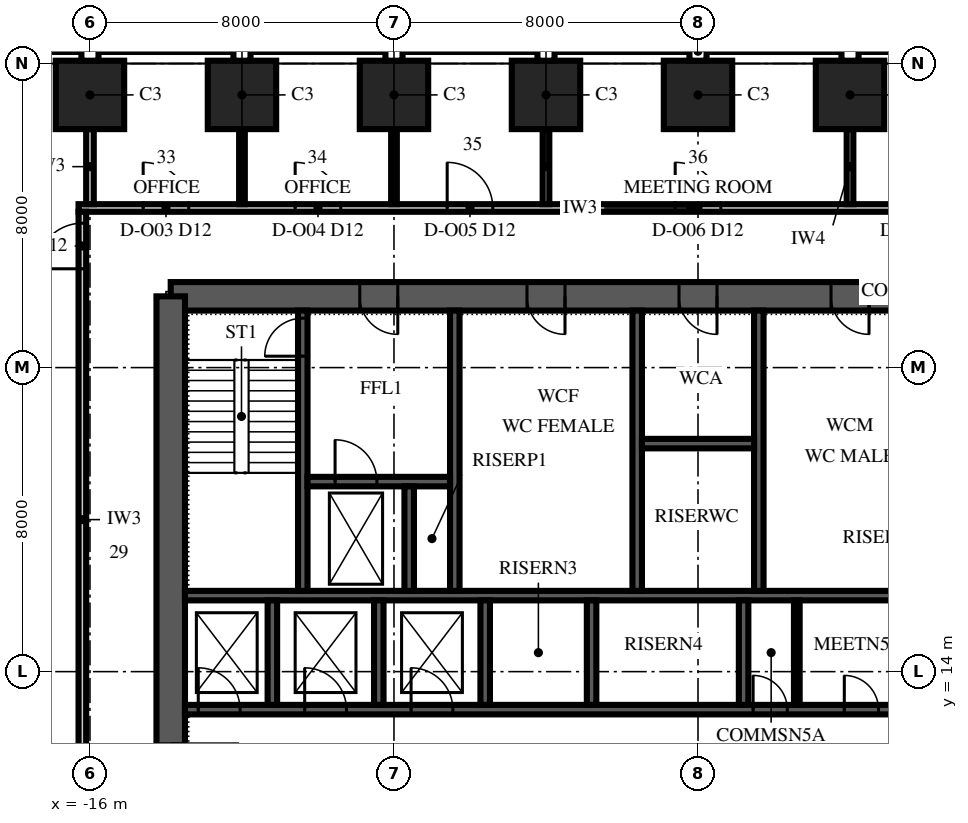
"""IFC4 building model, lengths in metres.
Left out: names, types, materials, properties, quantities, classifications, styles, units other than length and angle.
Written with IfcOpenShell. Run it as: python <this file> out.ifc"""

import sys

from ifc_helpers import new_model, si_unit, direction, frame, frame_2d, origin, origin_2d, place, context, subcontext, project, spatial, polyline, rectangle, outline, extrude, element, fill, save


model = new_model("IFC4")
c1 = context("Model", 3, precision=1e-05, world=origin(), true_north=direction((0.0, 1.0)))
c2 = subcontext(c1, "Body", "Model", "MODEL_VIEW")
j1 = project(units=[si_unit("LENGTHUNIT", "METRE"), si_unit("PLANEANGLEUNIT", "RADIAN")], contexts=[c1])
p1 = place(None, origin())
s1 = spatial("IfcSite", under=j1, at=p1, CompositionType="ELEMENT")
p2 = place(p1, origin())
s2 = spatial("IfcBuilding", under=s1, at=p2, CompositionType="ELEMENT")
p3 = place(p2, frame((0.0, 0.0, 127.0)))
s3 = spatial("IfcBuildingStorey", under=s2, at=p3, CompositionType="ELEMENT", Elevation=127.0)
for number, where, z_axis, x_axis in (
    (1, (4.0, 29.175, 0.0), (0.0, 0.0, 1.0), (-1.0, 0.0, 0.0)),
    (2, (0.0, 29.175, 0.0), (0.0, 0.0, 1.0), (-1.0, 0.0, 0.0)),
    (3, (-4.0, 29.175, 0.0), (0.0, 0.0, 1.0), (-1.0, 0.0, 0.0)),
    (4, (-8.0, 29.175, 0.0), (0.0, 0.0, 1.0), (-1.0, 0.0, 0.0)),
    (5, (-12.0, 29.175, 0.0), (0.0, 0.0, 1.0), (-1.0, 0.0, 0.0)),
    (6, (-16.0, 29.175, 0.0), (0.0, 0.0, 1.0), (-1.0, 0.0, 0.0)),
):
    element("IfcColumn", number, at=place(p3, frame(where, z_axis=z_axis, x_axis=x_axis)), inside=s3, PredefinedType="COLUMN", context=c2, shape_type="SweptSolid", body=[
        extrude(rectangle(XDim=1.8, YDim=1.8, at=origin_2d()), origin(), (0.0, 0.0, 1.0), 4.0),
    ])
p4 = place(p3, frame((13.875, 23.875, 0.0), z_axis=(0.0, 0.0, 1.0), x_axis=(-1.0, 0.0, 0.0)))
e7 = element("IfcWall", 7, at=p4, inside=s3, PredefinedType="SHEAR", context=c2, shape_type="SweptSolid", body=[
    extrude(rectangle(XDim=27.75, YDim=0.75, at=frame_2d((13.875, 0.0))), origin(), (0.0, 0.0, 1.0), 4.0),
])
p5 = place(p4, frame((21.775, 0.0, 0.0)))
e8 = element("IfcOpeningElement", 8, at=p5, cuts=e7, PredefinedType="OPENING", context=c2, shape_type="SweptSolid", body=[
    extrude(rectangle(XDim=1.0, YDim=2.1, at=frame_2d((0.5, 1.05))), frame((0.0, 0.39, 0.0), z_axis=(0.0, -1.0, 0.0), x_axis=(1.0, 0.0, 0.0)), (0.0, 0.0, 1.0), 0.78),
])
p6 = place(p4, frame((4.975, 0.0, 0.0)))
e9 = element("IfcOpeningElement", 9, at=p6, cuts=e7, PredefinedType="OPENING", context=c2, shape_type="SweptSolid", body=[
    extrude(rectangle(XDim=1.0, YDim=2.1, at=frame_2d((0.5, 1.05))), frame((0.0, 0.39, 0.0), z_axis=(0.0, -1.0, 0.0), x_axis=(1.0, 0.0, 0.0)), (0.0, 0.0, 1.0), 0.78),
])
p7 = place(p4, frame((17.375, 0.0, 0.0)))
e10 = element("IfcOpeningElement", 10, at=p7, cuts=e7, PredefinedType="OPENING", context=c2, shape_type="SweptSolid", body=[
    extrude(rectangle(XDim=1.0, YDim=2.1, at=frame_2d((0.5, 1.05))), frame((0.0, 0.39, 0.0), z_axis=(0.0, -1.0, 0.0), x_axis=(1.0, 0.0, 0.0)), (0.0, 0.0, 1.0), 0.78),
])
p8 = place(p4, frame((13.375, 0.0, 0.0)))
e11 = element("IfcOpeningElement", 11, at=p8, cuts=e7, PredefinedType="OPENING", context=c2, shape_type="SweptSolid", body=[
    extrude(rectangle(XDim=1.0, YDim=2.1, at=frame_2d((0.5, 1.05))), frame((0.0, 0.39, 0.0), z_axis=(0.0, -1.0, 0.0), x_axis=(1.0, 0.0, 0.0)), (0.0, 0.0, 1.0), 0.78),
])
p9 = place(p4, frame((9.375, 0.0, 0.0)))
e12 = element("IfcOpeningElement", 12, at=p9, cuts=e7, PredefinedType="OPENING", context=c2, shape_type="SweptSolid", body=[
    extrude(rectangle(XDim=1.0, YDim=2.1, at=frame_2d((0.5, 1.05))), frame((0.0, 0.39, 0.0), z_axis=(0.0, -1.0, 0.0), x_axis=(1.0, 0.0, 0.0)), (0.0, 0.0, 1.0), 0.78),
])
p10 = place(p3, frame((-13.875, 23.875, 0.0), z_axis=(0.0, 0.0, 1.0), x_axis=(0.0, -1.0, 0.0)))
e13 = element("IfcWall", 13, at=p10, inside=s3, PredefinedType="SHEAR", context=c2, shape_type="SweptSolid", body=[
    extrude(outline(polyline([(0.0, -0.375), (17.75, -0.375), (17.75, 0.0), (17.375, 0.0), (17.375, 0.375), (0.375, 0.375), (0.375, 0.0), (0.0, 0.0), (0.0, -0.375)])), origin(), (0.0, 0.0, 1.0), 4.0),
])
p11 = place(p10, frame((11.775, 0.0, 0.0)))
e14 = element("IfcOpeningElement", 14, at=p11, cuts=e13, PredefinedType="OPENING", context=c2, shape_type="SweptSolid", body=[
    extrude(rectangle(XDim=1.8, YDim=2.4, at=frame_2d((0.9, 1.2))), frame((0.0, 0.39, 0.0), z_axis=(0.0, -1.0, 0.0), x_axis=(1.0, 0.0, 0.0)), (0.0, 0.0, 1.0), 0.78),
])
p12 = place(p3, frame((-13.5, 13.0, 0.0), z_axis=(0.0, 0.0, 1.0), x_axis=(1.0, 0.0, 0.0)))
e15 = element("IfcWall", 15, at=p12, inside=s3, PredefinedType="SHEAR", context=c2, shape_type="SweptSolid", body=[
    extrude(rectangle(XDim=27.0, YDim=0.25, at=frame_2d((13.5, 0.0))), origin(), (0.0, 0.0, 1.0), 4.0),
])
p13 = place(p12, frame((0.35, 0.0, 0.0)))
e16 = element("IfcOpeningElement", 16, at=p13, cuts=e15, PredefinedType="OPENING", context=c2, shape_type="SweptSolid", body=[
    extrude(rectangle(XDim=1.1, YDim=2.1, at=frame_2d((0.55, 1.05))), frame((0.0, 0.14, 0.0), z_axis=(0.0, -1.0, 0.0), x_axis=(1.0, 0.0, 0.0)), (0.0, 0.0, 1.0), 0.28),
])
p14 = place(p12, frame((3.15, 0.0, 0.0)))
e17 = element("IfcOpeningElement", 17, at=p14, cuts=e15, PredefinedType="OPENING", context=c2, shape_type="SweptSolid", body=[
    extrude(rectangle(XDim=1.1, YDim=2.1, at=frame_2d((0.55, 1.05))), frame((0.0, 0.14, 0.0), z_axis=(0.0, -1.0, 0.0), x_axis=(1.0, 0.0, 0.0)), (0.0, 0.0, 1.0), 0.28),
])
p15 = place(p12, frame((5.95, 0.0, 0.0)))
e18 = element("IfcOpeningElement", 18, at=p15, cuts=e15, PredefinedType="OPENING", context=c2, shape_type="SweptSolid", body=[
    extrude(rectangle(XDim=1.1, YDim=2.1, at=frame_2d((0.55, 1.05))), frame((0.0, 0.14, 0.0), z_axis=(0.0, -1.0, 0.0), x_axis=(1.0, 0.0, 0.0)), (0.0, 0.0, 1.0), 0.28),
])
p16 = place(p12, frame((14.95, 0.0, 0.0)))
e19 = element("IfcOpeningElement", 19, at=p16, cuts=e15, PredefinedType="OPENING", context=c2, shape_type="SweptSolid", body=[
    extrude(rectangle(XDim=0.9, YDim=2.1, at=frame_2d((0.45, 1.05))), frame((0.0, 0.14, 0.0), z_axis=(0.0, -1.0, 0.0), x_axis=(1.0, 0.0, 0.0)), (0.0, 0.0, 1.0), 0.28),
])
p17 = place(p12, frame((17.35, 0.0, 0.0)))
e20 = element("IfcOpeningElement", 20, at=p17, cuts=e15, PredefinedType="OPENING", context=c2, shape_type="SweptSolid", body=[
    extrude(rectangle(XDim=0.9, YDim=2.1, at=frame_2d((0.45, 1.05))), frame((0.0, 0.14, 0.0), z_axis=(0.0, -1.0, 0.0), x_axis=(1.0, 0.0, 0.0)), (0.0, 0.0, 1.0), 0.28),
])
p18 = place(p12, frame((21.05, 0.0, 0.0)))
e21 = element("IfcOpeningElement", 21, at=p18, cuts=e15, PredefinedType="OPENING", context=c2, shape_type="SweptSolid", body=[
    extrude(rectangle(XDim=0.9, YDim=2.1, at=frame_2d((0.45, 1.05))), frame((0.0, 0.14, 0.0), z_axis=(0.0, -1.0, 0.0), x_axis=(1.0, 0.0, 0.0)), (0.0, 0.0, 1.0), 0.28),
])
p19 = place(p3, frame((-13.5, 16.0, 0.0), z_axis=(0.0, 0.0, 1.0), x_axis=(1.0, 0.0, 0.0)))
e22 = element("IfcWall", 22, at=p19, inside=s3, PredefinedType="SHEAR", context=c2, shape_type="SweptSolid", body=[
    extrude(rectangle(XDim=27.0, YDim=0.25, at=frame_2d((13.5, 0.0))), origin(), (0.0, 0.0, 1.0), 4.0),
])
for number, where, z_axis, x_axis in (
    (23, (-11.2, 13.125, 0.0), (0.0, 0.0, 1.0), (0.0, 1.0, 0.0)),
    (24, (-8.4, 13.125, 0.0), (0.0, 0.0, 1.0), (0.0, 1.0, 0.0)),
    (25, (-5.6, 13.125, 0.0), (0.0, 0.0, 1.0), (0.0, 1.0, 0.0)),
    (26, (-2.8, 13.125, 0.0), (0.0, 0.0, 1.0), (0.0, 1.0, 0.0)),
    (27, (1.2, 13.125, 0.0), (0.0, 0.0, 1.0), (0.0, 1.0, 0.0)),
):
    element("IfcWall", number, at=place(p3, frame(where, z_axis=z_axis, x_axis=x_axis)), inside=s3, PredefinedType="SHEAR", context=c2, shape_type="SweptSolid", body=[
        extrude(rectangle(XDim=2.75, YDim=0.25, at=frame_2d((1.375, 0.0))), origin(), (0.0, 0.0, 1.0), 4.0),
    ])
p20 = place(p3, frame((-10.4, 16.125, 0.0), z_axis=(0.0, 0.0, 1.0), x_axis=(0.0, 1.0, 0.0)))
e28 = element("IfcWall", 28, at=p20, inside=s3, PredefinedType="SHEAR", context=c2, shape_type="SweptSolid", body=[
    extrude(rectangle(XDim=7.375, YDim=0.25, at=frame_2d((3.688, 0.0))), origin(), (0.0, 0.0, 1.0), 4.0),
])
p21 = place(p20, frame((6.175, 0.0, 0.0)))
e29 = element("IfcOpeningElement", 29, at=p21, cuts=e28, PredefinedType="OPENING", context=c2, shape_type="SweptSolid", body=[
    extrude(rectangle(XDim=1.0, YDim=2.1, at=frame_2d((0.5, 1.05))), frame((0.0, 0.14, 0.0), z_axis=(0.0, -1.0, 0.0), x_axis=(1.0, 0.0, 0.0)), (0.0, 0.0, 1.0), 0.28),
])
for number, where, z_axis, x_axis in (
    (30, (-6.4, 16.125, 0.0), (0.0, 0.0, 1.0), (0.0, 1.0, 0.0)),
    (31, (-1.6, 16.125, 0.0), (0.0, 0.0, 1.0), (0.0, 1.0, 0.0)),
    (32, (1.6, 16.125, 0.0), (0.0, 0.0, 1.0), (0.0, 1.0, 0.0)),
):
    element("IfcWall", number, at=place(p3, frame(where, z_axis=z_axis, x_axis=x_axis)), inside=s3, PredefinedType="SHEAR", context=c2, shape_type="SweptSolid", body=[
        extrude(rectangle(XDim=7.375, YDim=0.25, at=frame_2d((3.688, 0.0))), origin(), (0.0, 0.0, 1.0), 4.0),
    ])
p22 = place(p3, frame((-10.275, 19.0, 0.0), z_axis=(0.0, 0.0, 1.0), x_axis=(1.0, 0.0, 0.0)))
e33 = element("IfcWall", 33, at=p22, inside=s3, PredefinedType="SHEAR", context=c2, shape_type="SweptSolid", body=[
    extrude(rectangle(XDim=3.75, YDim=0.25, at=frame_2d((1.875, 0.0))), origin(), (0.0, 0.0, 1.0), 4.0),
])
p23 = place(p22, frame((0.725, 0.0, 0.0)))
e34 = element("IfcOpeningElement", 34, at=p23, cuts=e33, PredefinedType="OPENING", context=c2, shape_type="SweptSolid", body=[
    extrude(rectangle(XDim=1.1, YDim=2.1, at=frame_2d((0.55, 1.05))), frame((0.0, 0.14, 0.0), z_axis=(0.0, -1.0, 0.0), x_axis=(1.0, 0.0, 0.0)), (0.0, 0.0, 1.0), 0.28),
])
p24 = place(p3, frame((-7.6, 16.125, 0.0), z_axis=(0.0, 0.0, 1.0), x_axis=(0.0, 1.0, 0.0)))
e35 = element("IfcWall", 35, at=p24, inside=s3, PredefinedType="SHEAR", context=c2, shape_type="SweptSolid", body=[
    extrude(rectangle(XDim=2.75, YDim=0.25, at=frame_2d((1.375, 0.0))), origin(), (0.0, 0.0, 1.0), 4.0),
])
p25 = place(p3, frame((-1.475, 20.0, 0.0), z_axis=(0.0, 0.0, 1.0), x_axis=(1.0, 0.0, 0.0)))
e36 = element("IfcWall", 36, at=p25, inside=s3, PredefinedType="SHEAR", context=c2, shape_type="SweptSolid", body=[
    extrude(rectangle(XDim=2.95, YDim=0.25, at=frame_2d((1.475, 0.0))), origin(), (0.0, 0.0, 1.0), 4.0),
])
p26 = place(p3, frame((2.6, 13.125, 0.0), z_axis=(0.0, 0.0, 1.0), x_axis=(0.0, 1.0, 0.0)))
e37 = element("IfcWall", 37, at=p26, inside=s3, PredefinedType="PARTITIONING", context=c2, shape_type="SweptSolid", body=[
    extrude(rectangle(XDim=2.75, YDim=0.15, at=frame_2d((1.375, 0.0))), origin(), (0.0, 0.0, 1.0), 3.85),
])
p27 = place(p3, frame((-16.3, 26.2, 0.0), z_axis=(0.0, 0.0, 1.0), x_axis=(1.0, 0.0, 0.0)))
e38 = element("IfcWall", 38, at=p27, inside=s3, PredefinedType="PARTITIONING", context=c2, shape_type="SweptSolid", body=[
    extrude(rectangle(XDim=32.2, YDim=0.2, at=frame_2d((16.1, 0.0))), origin(), (0.0, 0.0, 1.0), 3.4),
])
p28 = place(p27, frame((1.7, 0.0, 0.0)))
e39 = element("IfcOpeningElement", 39, at=p28, cuts=e38, PredefinedType="OPENING", context=c2, shape_type="SweptSolid", body=[
    extrude(rectangle(XDim=1.2, YDim=2.4, at=frame_2d((0.6, 1.2))), frame((0.0, 0.115, 0.0), z_axis=(0.0, -1.0, 0.0), x_axis=(1.0, 0.0, 0.0)), (0.0, 0.0, 1.0), 0.23),
])
p29 = place(p27, frame((5.7, 0.0, 0.0)))
e40 = element("IfcOpeningElement", 40, at=p29, cuts=e38, PredefinedType="OPENING", context=c2, shape_type="SweptSolid", body=[
    extrude(rectangle(XDim=1.2, YDim=2.4, at=frame_2d((0.6, 1.2))), frame((0.0, 0.115, 0.0), z_axis=(0.0, -1.0, 0.0), x_axis=(1.0, 0.0, 0.0)), (0.0, 0.0, 1.0), 0.23),
])
p30 = place(p27, frame((9.7, 0.0, 0.0)))
e41 = element("IfcOpeningElement", 41, at=p30, cuts=e38, PredefinedType="OPENING", context=c2, shape_type="SweptSolid", body=[
    extrude(rectangle(XDim=1.2, YDim=2.4, at=frame_2d((0.6, 1.2))), frame((0.0, 0.115, 0.0), z_axis=(0.0, -1.0, 0.0), x_axis=(1.0, 0.0, 0.0)), (0.0, 0.0, 1.0), 0.23),
])
p31 = place(p27, frame((15.7, 0.0, 0.0)))
e42 = element("IfcOpeningElement", 42, at=p31, cuts=e38, PredefinedType="OPENING", context=c2, shape_type="SweptSolid", body=[
    extrude(rectangle(XDim=1.2, YDim=2.4, at=frame_2d((0.6, 1.2))), frame((0.0, 0.115, 0.0), z_axis=(0.0, -1.0, 0.0), x_axis=(1.0, 0.0, 0.0)), (0.0, 0.0, 1.0), 0.23),
])
p32 = place(p27, frame((21.7, 0.0, 0.0)))
e43 = element("IfcOpeningElement", 43, at=p32, cuts=e38, PredefinedType="OPENING", context=c2, shape_type="SweptSolid", body=[
    extrude(rectangle(XDim=1.2, YDim=2.4, at=frame_2d((0.6, 1.2))), frame((0.0, 0.115, 0.0), z_axis=(0.0, -1.0, 0.0), x_axis=(1.0, 0.0, 0.0)), (0.0, 0.0, 1.0), 0.23),
])
p33 = place(p27, frame((25.7, 0.0, 0.0)))
e44 = element("IfcOpeningElement", 44, at=p33, cuts=e38, PredefinedType="OPENING", context=c2, shape_type="SweptSolid", body=[
    extrude(rectangle(XDim=1.2, YDim=2.4, at=frame_2d((0.6, 1.2))), frame((0.0, 0.115, 0.0), z_axis=(0.0, -1.0, 0.0), x_axis=(1.0, 0.0, 0.0)), (0.0, 0.0, 1.0), 0.23),
])
p34 = place(p27, frame((29.7, 0.0, 0.0)))
e45 = element("IfcOpeningElement", 45, at=p34, cuts=e38, PredefinedType="OPENING", context=c2, shape_type="SweptSolid", body=[
    extrude(rectangle(XDim=1.2, YDim=2.4, at=frame_2d((0.6, 1.2))), frame((0.0, 0.115, 0.0), z_axis=(0.0, -1.0, 0.0), x_axis=(1.0, 0.0, 0.0)), (0.0, 0.0, 1.0), 0.23),
])
p35 = place(p3, frame((-16.2, 9.9, 0.0), z_axis=(0.0, 0.0, 1.0), x_axis=(0.0, 1.0, 0.0)))
e46 = element("IfcWall", 46, at=p35, inside=s3, PredefinedType="PARTITIONING", context=c2, shape_type="SweptSolid", body=[
    extrude(rectangle(XDim=16.2, YDim=0.2, at=frame_2d((8.1, 0.0))), origin(), (0.0, 0.0, 1.0), 3.25),
])
p36 = place(p35, frame((14.7, 0.0, 0.0)))
e47 = element("IfcOpeningElement", 47, at=p36, cuts=e46, PredefinedType="OPENING", context=c2, shape_type="SweptSolid", body=[
    extrude(rectangle(XDim=1.2, YDim=2.4, at=frame_2d((0.6, 1.2))), frame((0.0, 0.115, 0.0), z_axis=(0.0, -1.0, 0.0), x_axis=(1.0, 0.0, 0.0)), (0.0, 0.0, 1.0), 0.23),
])
p37 = place(p3, frame((-16.0, 26.3, 0.0), z_axis=(0.0, 0.0, 1.0), x_axis=(0.0, 1.0, 0.0)))
e48 = element("IfcWall", 48, at=p37, inside=s3, PredefinedType="PARTITIONING", context=c2, shape_type="SweptSolid", body=[
    extrude(rectangle(XDim=1.975, YDim=0.2, at=frame_2d((0.987, 0.0))), origin(), (0.0, 0.0, 1.0), 3.4),
])
for number, where, z_axis, x_axis in (
    (49, (-12.0, 26.3, 0.0), (0.0, 0.0, 1.0), (0.0, 1.0, 0.0)),
    (50, (-8.0, 26.3, 0.0), (0.0, 0.0, 1.0), (0.0, 1.0, 0.0)),
):
    element("IfcWall", number, at=place(p3, frame(where, z_axis=z_axis, x_axis=x_axis)), inside=s3, PredefinedType="PARTITIONING", context=c2, shape_type="SweptSolid", body=[
        extrude(rectangle(XDim=1.975, YDim=0.15, at=frame_2d((0.987, 0.0))), origin(), (0.0, 0.0, 1.0), 3.4),
    ])
for number, where, z_axis, x_axis in (
    (51, (-4.0, 26.3, 0.0), (0.0, 0.0, 1.0), (0.0, 1.0, 0.0)),
    (52, (4.0, 26.3, 0.0), (0.0, 0.0, 1.0), (0.0, 1.0, 0.0)),
):
    element("IfcWall", number, at=place(p3, frame(where, z_axis=z_axis, x_axis=x_axis)), inside=s3, PredefinedType="PARTITIONING", context=c2, shape_type="SweptSolid", body=[
        extrude(rectangle(XDim=1.975, YDim=0.175, at=frame_2d((0.987, 0.0))), origin(), (0.0, 0.0, 1.0), 3.85),
    ])
p38 = place(p5, origin())
e53 = element("IfcDoor", 53, at=p38, inside=s3, OperationType="SINGLE_SWING_RIGHT", PredefinedType="DOOR", context=c2, shape_type="SweptSolid", body=[
    extrude(rectangle(XDim=1.0, YDim=2.1, at=frame_2d((0.5, 1.05))), frame((0.0, 0.375, 0.0), z_axis=(0.0, -1.0, 0.0), x_axis=(1.0, 0.0, 0.0)), (0.0, 0.0, 1.0), 0.75),
])
fill(e8, e53)
p39 = place(p7, origin())
e54 = element("IfcDoor", 54, at=p39, inside=s3, OperationType="SINGLE_SWING_LEFT", PredefinedType="DOOR", context=c2, shape_type="SweptSolid", body=[
    extrude(rectangle(XDim=1.0, YDim=2.1, at=frame_2d((0.5, 1.05))), frame((0.0, 0.375, 0.0), z_axis=(0.0, -1.0, 0.0), x_axis=(1.0, 0.0, 0.0)), (0.0, 0.0, 1.0), 0.75),
])
fill(e10, e54)
p40 = place(p8, origin())
e55 = element("IfcDoor", 55, at=p40, inside=s3, OperationType="SINGLE_SWING_LEFT", PredefinedType="DOOR", context=c2, shape_type="SweptSolid", body=[
    extrude(rectangle(XDim=1.0, YDim=2.1, at=frame_2d((0.5, 1.05))), frame((0.0, 0.375, 0.0), z_axis=(0.0, -1.0, 0.0), x_axis=(1.0, 0.0, 0.0)), (0.0, 0.0, 1.0), 0.75),
])
fill(e11, e55)
p41 = place(p9, origin())
e56 = element("IfcDoor", 56, at=p41, inside=s3, OperationType="SINGLE_SWING_LEFT", PredefinedType="DOOR", context=c2, shape_type="SweptSolid", body=[
    extrude(rectangle(XDim=1.0, YDim=2.1, at=frame_2d((0.5, 1.05))), frame((0.0, 0.375, 0.0), z_axis=(0.0, -1.0, 0.0), x_axis=(1.0, 0.0, 0.0)), (0.0, 0.0, 1.0), 0.75),
])
fill(e12, e56)
p42 = place(p21, origin())
e57 = element("IfcDoor", 57, at=p42, inside=s3, OperationType="SINGLE_SWING_LEFT", PredefinedType="DOOR", context=c2, shape_type="SweptSolid", body=[
    extrude(rectangle(XDim=1.0, YDim=2.1, at=frame_2d((0.5, 1.05))), frame((0.0, 0.125, 0.0), z_axis=(0.0, -1.0, 0.0), x_axis=(1.0, 0.0, 0.0)), (0.0, 0.0, 1.0), 0.25),
])
fill(e29, e57)
p43 = place(p13, origin())
e58 = element("IfcDoor", 58, at=p43, inside=s3, OperationType="SLIDING_TO_LEFT", PredefinedType="DOOR", context=c2, shape_type="SweptSolid", body=[
    extrude(rectangle(XDim=1.1, YDim=2.1, at=frame_2d((0.55, 1.05))), frame((0.0, 0.125, 0.0), z_axis=(0.0, -1.0, 0.0), x_axis=(1.0, 0.0, 0.0)), (0.0, 0.0, 1.0), 0.25),
])
fill(e16, e58)
p44 = place(p14, origin())
e59 = element("IfcDoor", 59, at=p44, inside=s3, OperationType="SLIDING_TO_LEFT", PredefinedType="DOOR", context=c2, shape_type="SweptSolid", body=[
    extrude(rectangle(XDim=1.1, YDim=2.1, at=frame_2d((0.55, 1.05))), frame((0.0, 0.125, 0.0), z_axis=(0.0, -1.0, 0.0), x_axis=(1.0, 0.0, 0.0)), (0.0, 0.0, 1.0), 0.25),
])
fill(e17, e59)
p45 = place(p15, origin())
e60 = element("IfcDoor", 60, at=p45, inside=s3, OperationType="SLIDING_TO_LEFT", PredefinedType="DOOR", context=c2, shape_type="SweptSolid", body=[
    extrude(rectangle(XDim=1.1, YDim=2.1, at=frame_2d((0.55, 1.05))), frame((0.0, 0.125, 0.0), z_axis=(0.0, -1.0, 0.0), x_axis=(1.0, 0.0, 0.0)), (0.0, 0.0, 1.0), 0.25),
])
fill(e18, e60)
p46 = place(p23, origin())
e61 = element("IfcDoor", 61, at=p46, inside=s3, OperationType="SLIDING_TO_RIGHT", PredefinedType="DOOR", context=c2, shape_type="SweptSolid", body=[
    extrude(rectangle(XDim=1.1, YDim=2.1, at=frame_2d((0.55, 1.05))), frame((0.0, 0.125, 0.0), z_axis=(0.0, -1.0, 0.0), x_axis=(1.0, 0.0, 0.0)), (0.0, 0.0, 1.0), 0.25),
])
fill(e34, e61)
p47 = place(p16, origin())
e62 = element("IfcDoor", 62, at=p47, inside=s3, OperationType="SINGLE_SWING_LEFT", PredefinedType="DOOR", context=c2, shape_type="SweptSolid", body=[
    extrude(rectangle(XDim=0.9, YDim=2.1, at=frame_2d((0.45, 1.05))), frame((0.0, 0.125, 0.0), z_axis=(0.0, -1.0, 0.0), x_axis=(1.0, 0.0, 0.0)), (0.0, 0.0, 1.0), 0.25),
])
fill(e19, e62)
p48 = place(p17, origin())
e63 = element("IfcDoor", 63, at=p48, inside=s3, OperationType="SINGLE_SWING_LEFT", PredefinedType="DOOR", context=c2, shape_type="SweptSolid", body=[
    extrude(rectangle(XDim=0.9, YDim=2.1, at=frame_2d((0.45, 1.05))), frame((0.0, 0.125, 0.0), z_axis=(0.0, -1.0, 0.0), x_axis=(1.0, 0.0, 0.0)), (0.0, 0.0, 1.0), 0.25),
])
fill(e20, e63)
p49 = place(p28, origin())
e64 = element("IfcDoor", 64, at=p49, inside=s3, OperationType="SINGLE_SWING_LEFT", PredefinedType="DOOR", context=c2, shape_type="SweptSolid", body=[
    extrude(rectangle(XDim=1.2, YDim=2.4, at=frame_2d((0.6, 1.2))), frame((0.0, 0.1, 0.0), z_axis=(0.0, -1.0, 0.0), x_axis=(1.0, 0.0, 0.0)), (0.0, 0.0, 1.0), 0.199),
])
fill(e39, e64)
p50 = place(p29, origin())
e65 = element("IfcDoor", 65, at=p50, inside=s3, OperationType="SINGLE_SWING_LEFT", PredefinedType="DOOR", context=c2, shape_type="SweptSolid", body=[
    extrude(rectangle(XDim=1.2, YDim=2.4, at=frame_2d((0.6, 1.2))), frame((0.0, 0.1, 0.0), z_axis=(0.0, -1.0, 0.0), x_axis=(1.0, 0.0, 0.0)), (0.0, 0.0, 1.0), 0.199),
])
fill(e40, e65)
p51 = place(p30, origin())
e66 = element("IfcDoor", 66, at=p51, inside=s3, OperationType="SINGLE_SWING_LEFT", PredefinedType="DOOR", context=c2, shape_type="SweptSolid", body=[
    extrude(rectangle(XDim=1.2, YDim=2.4, at=frame_2d((0.6, 1.2))), frame((0.0, 0.1, 0.0), z_axis=(0.0, -1.0, 0.0), x_axis=(1.0, 0.0, 0.0)), (0.0, 0.0, 1.0), 0.199),
])
fill(e41, e66)
p52 = place(p31, origin())
e67 = element("IfcDoor", 67, at=p52, inside=s3, OperationType="SINGLE_SWING_LEFT", PredefinedType="DOOR", context=c2, shape_type="SweptSolid", body=[
    extrude(rectangle(XDim=1.2, YDim=2.4, at=frame_2d((0.6, 1.2))), frame((0.0, 0.1, 0.0), z_axis=(0.0, -1.0, 0.0), x_axis=(1.0, 0.0, 0.0)), (0.0, 0.0, 1.0), 0.199),
])
fill(e42, e67)
p53 = place(p36, origin())
e68 = element("IfcDoor", 68, at=p53, inside=s3, OperationType="SINGLE_SWING_LEFT", PredefinedType="DOOR", context=c2, shape_type="SweptSolid", body=[
    extrude(rectangle(XDim=1.2, YDim=2.4, at=frame_2d((0.6, 1.2))), frame((0.0, 0.1, 0.0), z_axis=(0.0, -1.0, 0.0), x_axis=(1.0, 0.0, 0.0)), (0.0, 0.0, 1.0), 0.199),
])
fill(e47, e68)
save(model, sys.argv[1])
